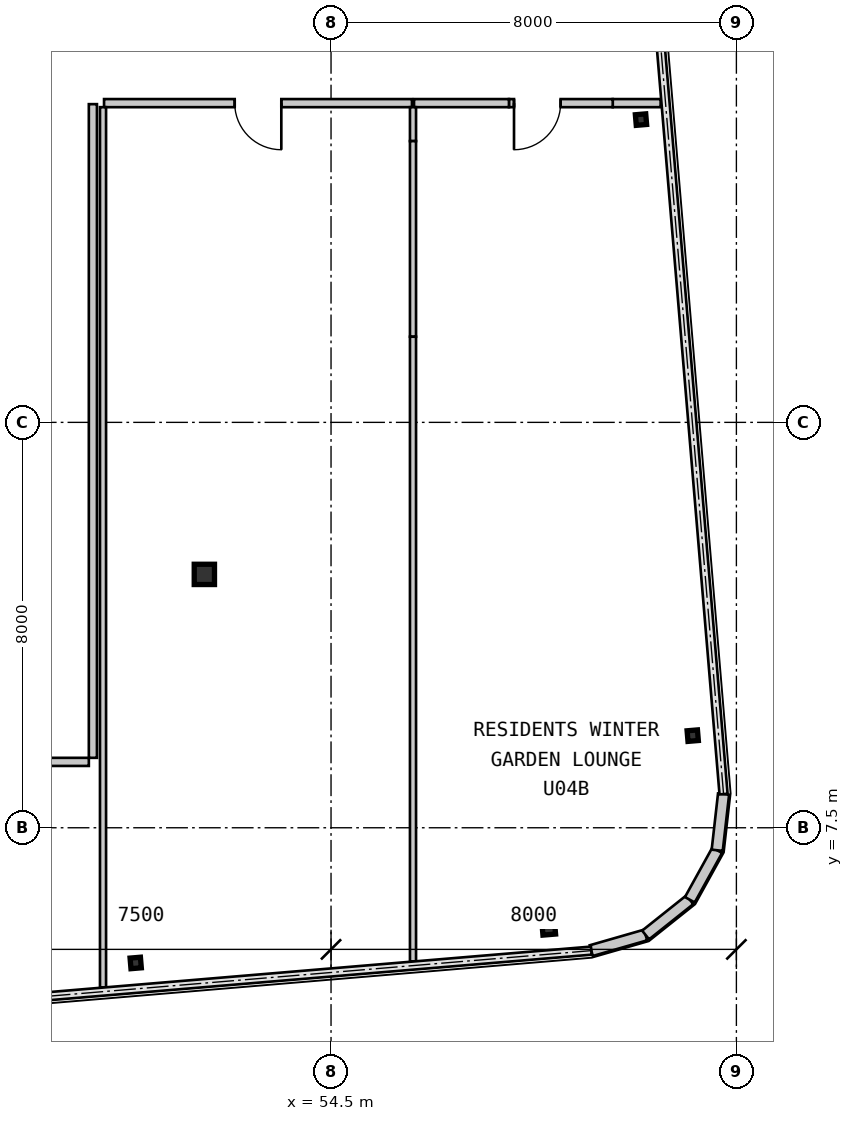
"""IFC4 building model, lengths in metres.
Left out: names, types, materials, properties, quantities, classifications, styles, units other than length and angle.
Written with IfcOpenShell. Run it as: python <this file> out.ifc"""

import sys

from ifc_helpers import new_model, si_unit, direction, frame, frame_2d, origin, origin_2d, place, context, subcontext, project, spatial, rectangle, hollow_rectangle, i_section, extrude, source, transform, mapped, element, fill, save


model = new_model("IFC4")
c1 = context("Model", 3, precision=1e-05, world=origin(), true_north=direction((0.0, 1.0)))
c2 = subcontext(c1, "Body", "Model", "MODEL_VIEW")
j1 = project(units=[si_unit("LENGTHUNIT", "METRE"), si_unit("PLANEANGLEUNIT", "RADIAN")], contexts=[c1])
p1 = place(None, origin())
s1 = spatial("IfcSite", under=j1, at=p1, CompositionType="ELEMENT")
p2 = place(p1, origin())
s2 = spatial("IfcBuilding", under=s1, at=p2, CompositionType="ELEMENT")
p3 = place(p2, frame((0.0, 0.0, 185.15)))
s3 = spatial("IfcBuildingStorey", under=s2, at=p3, CompositionType="ELEMENT", Elevation=185.15)
m1 = source(origin(), c2, "Body", "SweptSolid", [
    extrude(hollow_rectangle(XDim=0.4, YDim=0.4, WallThickness=0.016, at=origin_2d()), origin(), (0.0, 0.0, 1.0), 3.15),
])
p4 = place(p3, frame((52.0, 12.5, 0.0), z_axis=(0.0, 0.0, 1.0), x_axis=(1.0, 0.0, 0.0)))
e1 = element("IfcColumn", 1, at=p4, inside=s3, PredefinedType="COLUMN", context=c2, shape_type="MappedRepresentation", body=[
    mapped(m1, transform((0.0, 0.0, 0.0), scale=1.0)),
])
m2 = source(origin(), c2, "Body", "SweptSolid", [
    extrude(i_section(OverallWidth=0.205, OverallDepth=0.21, WebThickness=0.009, FlangeThickness=0.014, at=origin_2d()), origin(), (0.0, 0.0, 1.0), 3.15),
])
p5 = place(p3, frame((50.645, 4.832, 0.0), z_axis=(0.0, 0.0, 1.0), x_axis=(0.99649285925, 0.083677843332, 0.0)))
e2 = element("IfcColumn", 2, at=p5, inside=s3, PredefinedType="COLUMN", context=c2, shape_type="MappedRepresentation", body=[
    mapped(m2, transform((0.0, 0.0, 0.0), scale=1.0)),
])
m3 = source(origin(), c2, "Body", "SweptSolid", [
    extrude(hollow_rectangle(XDim=0.25, YDim=0.25, WallThickness=0.01, at=origin_2d()), origin(), (0.0, 0.0, 1.0), 3.15),
])
p6 = place(p3, frame((58.796, 5.516, 0.0), z_axis=(0.0, 0.0, 1.0), x_axis=(0.99649285925, 0.083677843332, 0.0)))
e3 = element("IfcColumn", 3, at=p6, inside=s3, PredefinedType="COLUMN", context=c2, shape_type="MappedRepresentation", body=[
    mapped(m3, transform((0.0, 0.0, 0.0), scale=1.0)),
])
for number, where, z_axis, x_axis in (
    (4, (61.638, 9.318, 0.0), (0.0, 0.0, 1.0), (0.996, 0.084, 0.0)),
    (5, (60.617, 21.475, 0.0), (0.0, 0.0, 1.0), (0.996, 0.084, 0.0)),
):
    element("IfcColumn", number, at=place(p3, frame(where, z_axis=z_axis, x_axis=x_axis)), inside=s3, PredefinedType="COLUMN", context=c2, shape_type="MappedRepresentation", body=[
        mapped(m2, transform((0.0, 0.0, 0.0), scale=1.0)),
    ])
m4 = source(origin(), c2, "Body", "SweptSolid", [
    extrude(rectangle(XDim=1.116, YDim=0.22, at=frame_2d((0.558, 0.0))), origin(), (0.0, 0.0, 1.0), 2.93),
])
for number, where, z_axis, x_axis in (
    (6, (59.636, 5.075, 0.0), (0.0, 0.0, 1.0), (0.961, 0.277, 0.0)),
    (7, (60.708, 5.384, 0.0), (0.0, 0.0, 1.0), (0.782, 0.623, 0.0)),
    (8, (61.581, 6.079, 0.0), (0.0, 0.0, 1.0), (0.484, 0.875, 0.0)),
    (9, (62.121, 7.056, 0.0), (0.0, 0.0, 1.0), (0.112, 0.994, 0.0)),
):
    element("IfcWall", number, at=place(p3, frame(where, z_axis=z_axis, x_axis=x_axis)), inside=s3, PredefinedType="SOLIDWALL", context=c2, shape_type="MappedRepresentation", body=[
        mapped(m4, transform((0.0, 0.0, 0.0), scale=1.0)),
    ])
m5 = source(origin(), c2, "Body", "SweptSolid", [
    extrude(rectangle(XDim=12.9, YDim=0.16, at=frame_2d((6.45, 0.0))), origin(), (0.0, 0.0, 1.0), 2.93),
])
p7 = place(p3, frame((49.8, 21.78, 0.0), z_axis=(0.0, 0.0, 1.0), x_axis=(0.0, -1.0, 0.0)))
e10 = element("IfcWall", 10, at=p7, inside=s3, PredefinedType="PARTITIONING", context=c2, shape_type="MappedRepresentation", body=[
    mapped(m5, transform((0.0, 0.0, 0.0), scale=1.0)),
])
m6 = source(origin(), c2, "Body", "SweptSolid", [
    extrude(rectangle(XDim=2.04, YDim=0.16, at=frame_2d((1.02, 0.0))), origin(), (0.0, 0.0, 1.0), 2.93),
])
p8 = place(p3, frame((49.72, 8.8, 0.0), z_axis=(0.0, 0.0, 1.0), x_axis=(-1.0, 0.0, 0.0)))
e11 = element("IfcWall", 11, at=p8, inside=s3, PredefinedType="PARTITIONING", context=c2, shape_type="MappedRepresentation", body=[
    mapped(m6, transform((0.0, 0.0, 0.0), scale=1.0)),
])
m7 = source(origin(), c2, "Body", "SweptSolid", [
    extrude(rectangle(XDim=6.077, YDim=0.16, at=frame_2d((3.039, 0.0))), origin(), (0.0, 0.0, 1.0), 2.93),
])
p9 = place(p3, frame((56.097, 21.8, 0.0), z_axis=(0.0, 0.0, 1.0), x_axis=(-1.0, 0.0, 0.0)))
e12 = element("IfcWall", 12, at=p9, inside=s3, PredefinedType="PARTITIONING", context=c2, shape_type="MappedRepresentation", body=[
    mapped(m7, transform((0.0, 0.0, 0.0), scale=1.0)),
])
m8 = source(origin(), c2, "Body", "SweptSolid", [
    extrude(rectangle(XDim=0.92, YDim=2.1, at=frame_2d((0.46, 1.05))), frame((0.0, 0.09, 0.0), z_axis=(0.0, -1.0, 0.0), x_axis=(1.0, 0.0, 0.0)), (0.0, 0.0, 1.0), 0.18),
])
p10 = place(p9, frame((2.579, 0.0, 0.0)))
e13 = element("IfcOpeningElement", 13, at=p10, cuts=e12, PredefinedType="OPENING", context=c2, shape_type="MappedRepresentation", body=[
    mapped(m8, transform((0.0, 0.0, 0.0), scale=1.0)),
])
m9 = source(origin(), c2, "Body", "SweptSolid", [
    extrude(rectangle(XDim=0.945, YDim=0.16, at=frame_2d((0.473, 0.0))), origin(), (0.0, 0.0, 1.0), 2.93),
])
p11 = place(p3, frame((61.005, 21.8, 0.0), z_axis=(0.0, 0.0, 1.0), x_axis=(-1.0, 0.0, 0.0)))
e14 = element("IfcWall", 14, at=p11, inside=s3, PredefinedType="PARTITIONING", context=c2, shape_type="MappedRepresentation", body=[
    mapped(m9, transform((0.0, 0.0, 0.0), scale=1.0)),
])
m10 = source(origin(), c2, "Body", "SweptSolid", [
    extrude(rectangle(XDim=2.048, YDim=0.16, at=frame_2d((1.024, 0.0))), origin(), (0.0, 0.0, 1.0), 2.47),
])
p12 = place(p3, frame((60.059, 21.8, 0.0), z_axis=(0.0, 0.0, 1.0), x_axis=(-1.0, 0.0, 0.0)))
e15 = element("IfcWall", 15, at=p12, inside=s3, PredefinedType="PARTITIONING", context=c2, shape_type="MappedRepresentation", body=[
    mapped(m10, transform((0.0, 0.0, 0.0), scale=1.0)),
])
p13 = place(p12, frame((1.028, 0.0, 0.0)))
e16 = element("IfcOpeningElement", 16, at=p13, cuts=e15, PredefinedType="OPENING", context=c2, shape_type="MappedRepresentation", body=[
    mapped(m8, transform((0.0, 0.0, 0.0), scale=1.0)),
])
m11 = source(origin(), c2, "Body", "SweptSolid", [
    extrude(rectangle(XDim=1.874, YDim=0.16, at=frame_2d((0.937, 0.0))), origin(), (0.0, 0.0, 1.0), 2.93),
])
p14 = place(p3, frame((58.011, 21.8, 0.0), z_axis=(0.0, 0.0, 1.0), x_axis=(-1.0, 0.0, 0.0)))
e17 = element("IfcWall", 17, at=p14, inside=s3, PredefinedType="PARTITIONING", context=c2, shape_type="MappedRepresentation", body=[
    mapped(m11, transform((0.0, 0.0, 0.0), scale=1.0)),
])
m12 = source(origin(), c2, "Body", "SweptSolid", [
    extrude(rectangle(XDim=17.37, YDim=0.12, at=frame_2d((8.685, 0.0))), origin(), (0.0, 0.0, 1.0), 2.93),
])
p15 = place(p3, frame((50.0, 21.72, 0.0), z_axis=(0.0, 0.0, 1.0), x_axis=(0.0, -1.0, 0.0)))
e18 = element("IfcWall", 18, at=p15, inside=s3, PredefinedType="PARTITIONING", context=c2, shape_type="MappedRepresentation", body=[
    mapped(m12, transform((0.0, 0.0, 0.0), scale=1.0)),
])
m13 = source(origin(), c2, "Body", "SweptSolid", [
    extrude(rectangle(XDim=0.669, YDim=0.12, at=frame_2d((0.335, 0.0))), origin(), (0.0, 0.0, 1.0), 2.93),
])
p16 = place(p3, frame((56.118, 21.72, 0.0), z_axis=(0.0, 0.0, 1.0), x_axis=(0.0, -1.0, 0.0)))
e19 = element("IfcWall", 19, at=p16, inside=s3, PredefinedType="PARTITIONING", context=c2, shape_type="MappedRepresentation", body=[
    mapped(m13, transform((0.0, 0.0, 0.0), scale=1.0)),
])
m14 = source(origin(), c2, "Body", "SweptSolid", [
    extrude(rectangle(XDim=3.86, YDim=0.12, at=frame_2d((1.93, 0.0))), origin(), (0.0, 0.0, 1.0), 2.397),
])
p17 = place(p3, frame((56.118, 21.051, 0.0), z_axis=(0.0, 0.0, 1.0), x_axis=(0.0, -1.0, 0.0)))
e20 = element("IfcWall", 20, at=p17, inside=s3, PredefinedType="PARTITIONING", context=c2, shape_type="MappedRepresentation", body=[
    mapped(m14, transform((0.0, 0.0, 0.0), scale=1.0)),
])
m15 = source(origin(), c2, "Body", "SweptSolid", [
    extrude(rectangle(XDim=12.327, YDim=0.12, at=frame_2d((6.164, 0.0))), origin(), (0.0, 0.0, 1.0), 2.93),
])
p18 = place(p3, frame((56.118, 17.19, 0.0), z_axis=(0.0, 0.0, 1.0), x_axis=(0.0, -1.0, 0.0)))
e21 = element("IfcWall", 21, at=p18, inside=s3, PredefinedType="PARTITIONING", context=c2, shape_type="MappedRepresentation", body=[
    mapped(m15, transform((0.0, 0.0, 0.0), scale=1.0)),
])
m16 = source(origin(), c2, "Body", "SweptSolid", [
    extrude(rectangle(XDim=0.92, YDim=2.1, at=frame_2d((0.46, 1.05))), frame((0.0, 0.025, 0.0), z_axis=(0.0, -1.0, 0.0), x_axis=(1.0, 0.0, 0.0)), (0.0, 0.0, 1.0), 0.05),
])
p19 = place(p10, origin())
e22 = element("IfcDoor", 22, at=p19, inside=s3, OperationType="SINGLE_SWING_LEFT", PredefinedType="DOOR", context=c2, shape_type="MappedRepresentation", body=[
    mapped(m16, transform((0.0, 0.0, 0.0), scale=1.0)),
])
fill(e13, e22)
p20 = place(p13, origin())
e23 = element("IfcDoor", 23, at=p20, inside=s3, OperationType="SINGLE_SWING_RIGHT", PredefinedType="DOOR", context=c2, shape_type="MappedRepresentation", body=[
    mapped(m16, transform((0.0, 0.0, 0.0), scale=1.0)),
])
fill(e16, e23)
save(model, sys.argv[1])
